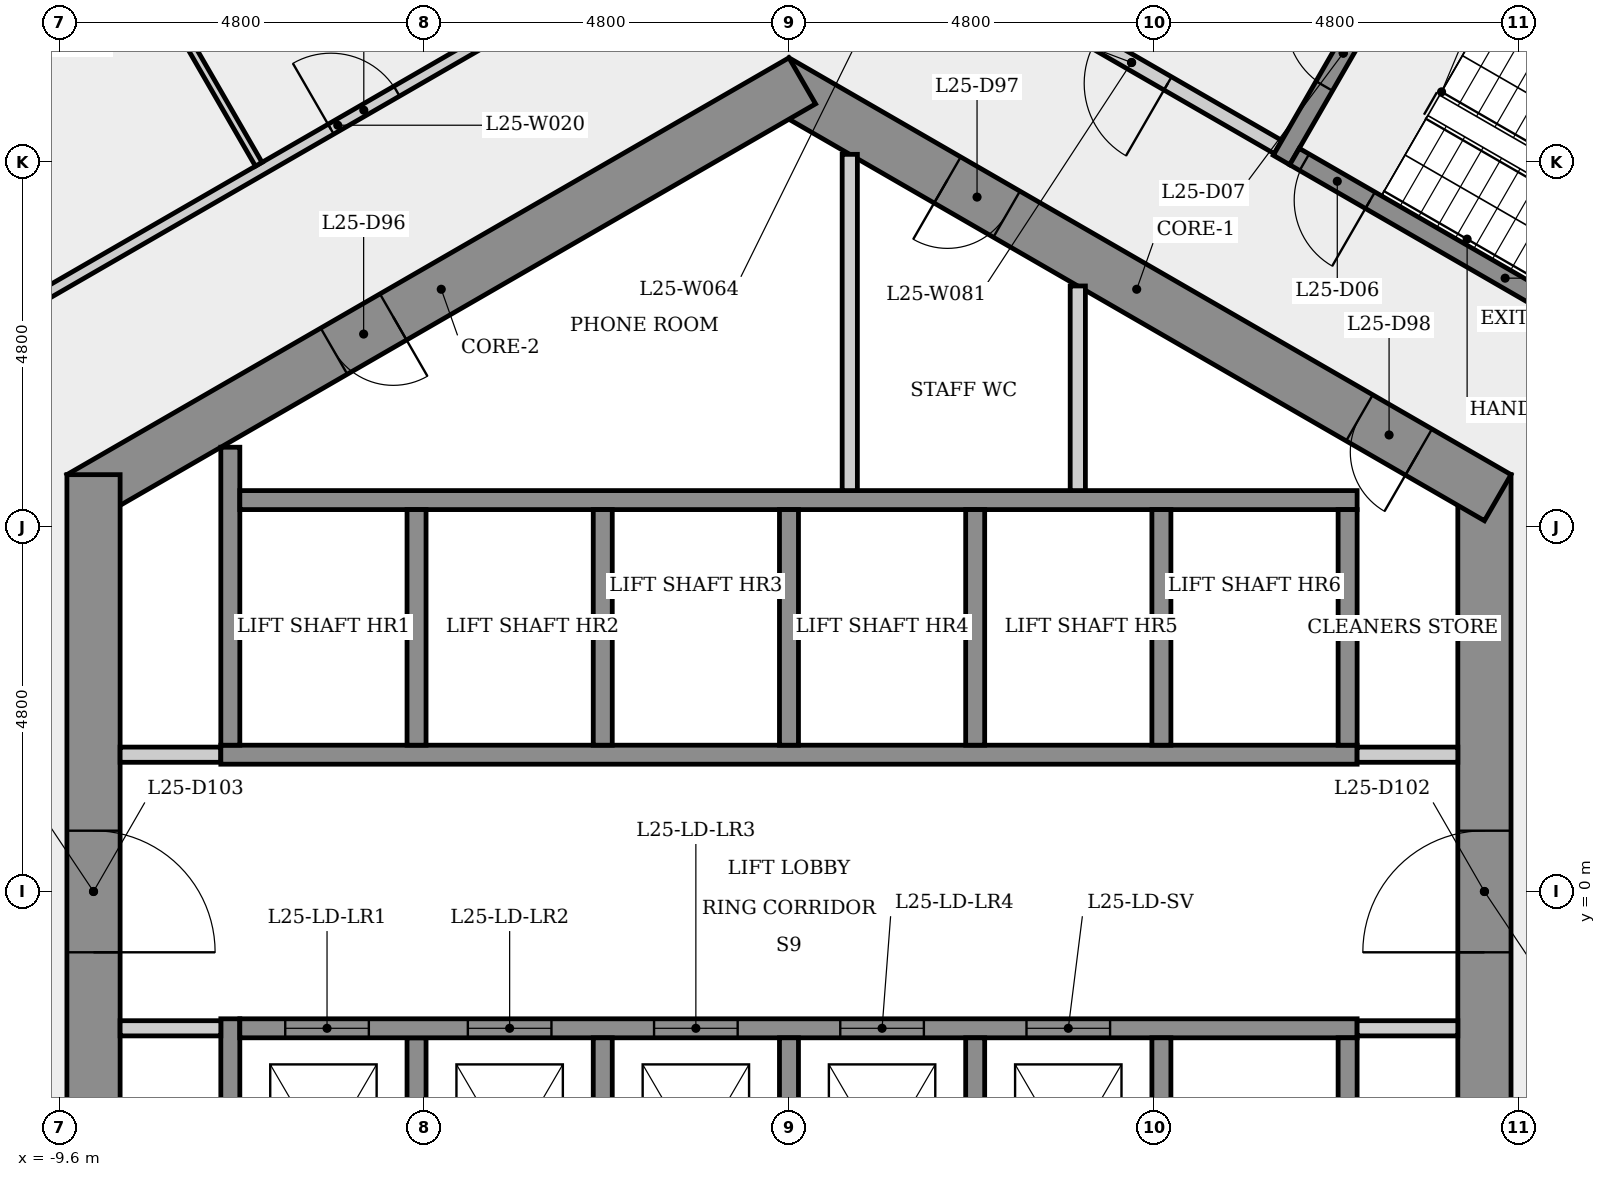
"""IFC4 building model, lengths in metres.
Left out: names, types, materials, properties, quantities, classifications, styles, units other than length and angle.
Written with IfcOpenShell. Run it as: python <this file> out.ifc"""

import sys

from ifc_helpers import new_model, si_unit, direction, frame, frame_2d, origin, place, context, subcontext, project, spatial, rectangle, extrude, element, fill, save


model = new_model("IFC4")
c1 = context("Model", 3, precision=1e-05, world=origin(), true_north=direction((0.0, 1.0)))
c2 = subcontext(c1, "Body", "Model", "MODEL_VIEW")
j1 = project(units=[si_unit("LENGTHUNIT", "METRE"), si_unit("PLANEANGLEUNIT", "RADIAN")], contexts=[c1])
p1 = place(None, origin())
s1 = spatial("IfcSite", under=j1, at=p1, CompositionType="ELEMENT")
p2 = place(p1, origin())
s2 = spatial("IfcBuilding", under=s1, at=p2, CompositionType="ELEMENT")
p3 = place(p2, frame((0.0, 0.0, 96.7)))
s3 = spatial("IfcBuildingStorey", under=s2, at=p3, CompositionType="ELEMENT", Elevation=96.7)
p4 = place(p3, frame((9.15, -5.485, 0.0), z_axis=(0.0, 0.0, 1.0), x_axis=(0.0, 1.0, 0.0)))
e1 = element("IfcWall", 1, at=p4, inside=s3, PredefinedType="SHEAR", context=c2, shape_type="SweptSolid", body=[
    extrude(rectangle(XDim=10.97, YDim=0.7, at=frame_2d((5.485, 0.0))), origin(), (0.0, 0.0, 1.0), 3.4),
])
p5 = place(p4, frame((4.685, 0.0, 0.0)))
e2 = element("IfcOpeningElement", 2, at=p5, cuts=e1, PredefinedType="OPENING", context=c2, shape_type="SweptSolid", body=[
    extrude(rectangle(XDim=1.6, YDim=2.1, at=frame_2d((0.8, 1.05))), frame((0.0, 0.36, 0.0), z_axis=(0.0, -1.0, 0.0), x_axis=(1.0, 0.0, 0.0)), (0.0, 0.0, 1.0), 0.72),
])
p6 = place(p3, frame((9.325, 5.182, 0.0), z_axis=(0.0, 0.0, 1.0), x_axis=(-0.866023993627, 0.500002442456, 0.0)))
e3 = element("IfcWall", 3, at=p6, inside=s3, PredefinedType="SHEAR", context=c2, shape_type="SweptSolid", body=[
    extrude(rectangle(XDim=10.97, YDim=0.7, at=frame_2d((5.485, 0.0))), origin(), (0.0, 0.0, 1.0), 3.4),
])
p7 = place(p6, frame((7.46, 0.0, 0.0)))
e4 = element("IfcOpeningElement", 4, at=p7, cuts=e3, PredefinedType="OPENING", context=c2, shape_type="SweptSolid", body=[
    extrude(rectangle(XDim=0.9, YDim=2.1, at=frame_2d((0.45, 1.05))), frame((0.0, 0.36, 0.0), z_axis=(0.0, -1.0, 0.0), x_axis=(1.0, 0.0, 0.0)), (0.0, 0.0, 1.0), 0.72),
])
p8 = place(p6, frame((1.201, 0.0, 0.0)))
e5 = element("IfcOpeningElement", 5, at=p8, cuts=e3, PredefinedType="OPENING", context=c2, shape_type="SweptSolid", body=[
    extrude(rectangle(XDim=0.9, YDim=2.1, at=frame_2d((0.45, 1.05))), frame((0.0, 0.36, 0.0), z_axis=(0.0, -1.0, 0.0), x_axis=(1.0, 0.0, 0.0)), (0.0, 0.0, 1.0), 0.72),
])
p9 = place(p3, frame((0.175, 10.667, 0.0), z_axis=(0.0, 0.0, 1.0), x_axis=(-0.866023993627, -0.500002442456, 0.0)))
e6 = element("IfcWall", 6, at=p9, inside=s3, PredefinedType="SHEAR", context=c2, shape_type="SweptSolid", body=[
    extrude(rectangle(XDim=10.97, YDim=0.7, at=frame_2d((5.485, 0.0))), origin(), (0.0, 0.0, 1.0), 3.4),
])
p10 = place(p9, frame((6.214, 0.0, 0.0)))
e7 = element("IfcOpeningElement", 7, at=p10, cuts=e6, PredefinedType="OPENING", context=c2, shape_type="SweptSolid", body=[
    extrude(rectangle(XDim=0.9, YDim=2.1, at=frame_2d((0.45, 1.05))), frame((0.0, 0.36, 0.0), z_axis=(0.0, -1.0, 0.0), x_axis=(1.0, 0.0, 0.0)), (0.0, 0.0, 1.0), 0.72),
])
p11 = place(p3, frame((-9.15, 5.485, 0.0), z_axis=(0.0, 0.0, 1.0), x_axis=(0.0, -1.0, 0.0)))
e8 = element("IfcWall", 8, at=p11, inside=s3, PredefinedType="SHEAR", context=c2, shape_type="SweptSolid", body=[
    extrude(rectangle(XDim=10.97, YDim=0.7, at=frame_2d((5.485, 0.0))), origin(), (0.0, 0.0, 1.0), 3.4),
])
p12 = place(p11, frame((4.685, 0.0, 0.0)))
e9 = element("IfcOpeningElement", 9, at=p12, cuts=e8, PredefinedType="OPENING", context=c2, shape_type="SweptSolid", body=[
    extrude(rectangle(XDim=1.6, YDim=2.1, at=frame_2d((0.8, 1.05))), frame((0.0, 0.36, 0.0), z_axis=(0.0, -1.0, 0.0), x_axis=(1.0, 0.0, 0.0)), (0.0, 0.0, 1.0), 0.72),
])
p13 = place(p3, frame((-10.588, 7.397, 0.0), z_axis=(0.0, 0.0, 1.0), x_axis=(0.866026257053, 0.499998522093, 0.0)))
e10 = element("IfcWall", 10, at=p13, inside=s3, PredefinedType="PARTITIONING", context=c2, shape_type="SweptSolid", body=[
    extrude(rectangle(XDim=10.743, YDim=0.15, at=frame_2d((5.371, 0.0))), origin(), (0.0, 0.0, 1.0), 3.05),
])
p14 = place(p13, frame((5.267, 0.0, 0.0)))
e11 = element("IfcOpeningElement", 11, at=p14, cuts=e10, PredefinedType="OPENING", context=c2, shape_type="SweptSolid", body=[
    extrude(rectangle(XDim=1.0, YDim=2.1, at=frame_2d((0.5, 1.05))), frame((0.0, 0.085, 0.0), z_axis=(0.0, -1.0, 0.0), x_axis=(1.0, 0.0, 0.0)), (0.0, 0.0, 1.0), 0.17),
])
p15 = place(p3, frame((-8.8, 1.8, 0.0), z_axis=(0.0, 0.0, 1.0), x_axis=(1.0, 0.0, 0.0)))
e12 = element("IfcWall", 12, at=p15, inside=s3, PredefinedType="PARTITIONING", context=c2, shape_type="SweptSolid", body=[
    extrude(rectangle(XDim=1.325, YDim=0.2, at=frame_2d((0.663, 0.0))), origin(), (0.0, 0.0, 1.0), 3.05),
])
p16 = place(p3, frame((-7.475, 1.8, 0.0), z_axis=(0.0, 0.0, 1.0), x_axis=(1.0, 0.0, 0.0)))
e13 = element("IfcWall", 13, at=p16, inside=s3, PredefinedType="SHEAR", context=c2, shape_type="SweptSolid", body=[
    extrude(rectangle(XDim=14.95, YDim=0.25, at=frame_2d((7.475, 0.0))), origin(), (0.0, 0.0, 1.0), 3.05),
])
p17 = place(p3, frame((-7.35, -5.846, 0.0), z_axis=(0.0, 0.0, 1.0), x_axis=(0.0, 1.0, 0.0)))
e14 = element("IfcWall", 14, at=p17, inside=s3, PredefinedType="SHEAR", context=c2, shape_type="SweptSolid", body=[
    extrude(rectangle(XDim=4.171, YDim=0.25, at=frame_2d((2.085, 0.0))), origin(), (0.0, 0.0, 1.0), 3.05),
])
p18 = place(p3, frame((-7.35, 1.925, 0.0), z_axis=(0.0, 0.0, 1.0), x_axis=(0.0, 1.0, 0.0)))
e15 = element("IfcWall", 15, at=p18, inside=s3, PredefinedType="SHEAR", context=c2, shape_type="SweptSolid", body=[
    extrude(rectangle(XDim=3.921, YDim=0.25, at=frame_2d((1.96, 0.0))), origin(), (0.0, 0.0, 1.0), 3.05),
])
p19 = place(p3, frame((-7.225, 5.15, 0.0), z_axis=(0.0, 0.0, 1.0), x_axis=(1.0, 0.0, 0.0)))
e16 = element("IfcWall", 16, at=p19, inside=s3, PredefinedType="SHEAR", context=c2, shape_type="SweptSolid", body=[
    extrude(rectangle(XDim=14.7, YDim=0.25, at=frame_2d((7.35, 0.0))), origin(), (0.0, 0.0, 1.0), 3.05),
])
p20 = place(p3, frame((-7.475, -1.8, 0.0), z_axis=(0.0, 0.0, 1.0), x_axis=(-1.0, 0.0, 0.0)))
e17 = element("IfcWall", 17, at=p20, inside=s3, PredefinedType="PARTITIONING", context=c2, shape_type="SweptSolid", body=[
    extrude(rectangle(XDim=1.325, YDim=0.2, at=frame_2d((0.663, 0.0))), origin(), (0.0, 0.0, 1.0), 3.05),
])
p21 = place(p3, frame((-6.976, 9.569, 0.0), z_axis=(0.0, 0.0, 1.0), x_axis=(-0.499997453958, 0.866026873738, 0.0)))
e18 = element("IfcWall", 18, at=p21, inside=s3, PredefinedType="PARTITIONING", context=c2, shape_type="SweptSolid", body=[
    extrude(rectangle(XDim=7.71, YDim=0.1, at=frame_2d((3.855, 0.0))), origin(), (0.0, 0.0, 1.0), 3.05),
])
for number, where, z_axis, x_axis in (
    (19, (-4.9, -1.925, 0.0), (0.0, 0.0, 1.0), (0.0, -1.0, 0.0)),
    (20, (-4.9, 5.025, 0.0), (0.0, 0.0, 1.0), (0.0, -1.0, 0.0)),
):
    element("IfcWall", number, at=place(p3, frame(where, z_axis=z_axis, x_axis=x_axis)), inside=s3, PredefinedType="SHEAR", context=c2, shape_type="SweptSolid", body=[
        extrude(rectangle(XDim=3.1, YDim=0.25, at=frame_2d((1.55, 0.0))), origin(), (0.0, 0.0, 1.0), 3.4),
    ])
p22 = place(p3, frame((-7.225, -1.8, 0.0), z_axis=(0.0, 0.0, 1.0), x_axis=(1.0, 0.0, 0.0)))
e21 = element("IfcWall", 21, at=p22, inside=s3, PredefinedType="SHEAR", context=c2, shape_type="SweptSolid", body=[
    extrude(rectangle(XDim=14.7, YDim=0.25, at=frame_2d((7.35, 0.0))), origin(), (0.0, 0.0, 1.0), 3.05),
])
p23 = place(p22, frame((0.597, 0.0, 0.0)))
e22 = element("IfcOpeningElement", 22, at=p23, cuts=e21, PredefinedType="OPENING", context=c2, shape_type="SweptSolid", body=[
    extrude(rectangle(XDim=1.1, YDim=2.1, at=frame_2d((0.55, 1.05))), frame((0.0, 0.135, 0.0), z_axis=(0.0, -1.0, 0.0), x_axis=(1.0, 0.0, 0.0)), (0.0, 0.0, 1.0), 0.27),
])
p24 = place(p22, frame((3.0, 0.0, 0.0)))
e23 = element("IfcOpeningElement", 23, at=p24, cuts=e21, PredefinedType="OPENING", context=c2, shape_type="SweptSolid", body=[
    extrude(rectangle(XDim=1.1, YDim=2.1, at=frame_2d((0.55, 1.05))), frame((0.0, 0.135, 0.0), z_axis=(0.0, -1.0, 0.0), x_axis=(1.0, 0.0, 0.0)), (0.0, 0.0, 1.0), 0.27),
])
p25 = place(p22, frame((5.45, 0.0, 0.0)))
e24 = element("IfcOpeningElement", 24, at=p25, cuts=e21, PredefinedType="OPENING", context=c2, shape_type="SweptSolid", body=[
    extrude(rectangle(XDim=1.1, YDim=2.1, at=frame_2d((0.55, 1.05))), frame((0.0, 0.135, 0.0), z_axis=(0.0, -1.0, 0.0), x_axis=(1.0, 0.0, 0.0)), (0.0, 0.0, 1.0), 0.27),
])
p26 = place(p22, frame((7.9, 0.0, 0.0)))
e25 = element("IfcOpeningElement", 25, at=p26, cuts=e21, PredefinedType="OPENING", context=c2, shape_type="SweptSolid", body=[
    extrude(rectangle(XDim=1.1, YDim=2.1, at=frame_2d((0.55, 1.05))), frame((0.0, 0.135, 0.0), z_axis=(0.0, -1.0, 0.0), x_axis=(1.0, 0.0, 0.0)), (0.0, 0.0, 1.0), 0.27),
])
p27 = place(p22, frame((10.35, 0.0, 0.0)))
e26 = element("IfcOpeningElement", 26, at=p27, cuts=e21, PredefinedType="OPENING", context=c2, shape_type="SweptSolid", body=[
    extrude(rectangle(XDim=1.1, YDim=2.1, at=frame_2d((0.55, 1.05))), frame((0.0, 0.135, 0.0), z_axis=(0.0, -1.0, 0.0), x_axis=(1.0, 0.0, 0.0)), (0.0, 0.0, 1.0), 0.27),
])
for number, where, z_axis, x_axis in (
    (27, (-2.45, -1.925, 0.0), (0.0, 0.0, 1.0), (0.0, -1.0, 0.0)),
    (28, (-2.45, 5.025, 0.0), (0.0, 0.0, 1.0), (0.0, -1.0, 0.0)),
    (29, (0.0, -1.925, 0.0), (0.0, 0.0, 1.0), (0.0, -1.0, 0.0)),
    (30, (0.0, 5.025, 0.0), (0.0, 0.0, 1.0), (0.0, -1.0, 0.0)),
):
    element("IfcWall", number, at=place(p3, frame(where, z_axis=z_axis, x_axis=x_axis)), inside=s3, PredefinedType="SHEAR", context=c2, shape_type="SweptSolid", body=[
        extrude(rectangle(XDim=3.1, YDim=0.25, at=frame_2d((1.55, 0.0))), origin(), (0.0, 0.0, 1.0), 3.4),
    ])
p28 = place(p3, frame((0.8, 9.699, 0.0), z_axis=(0.0, 0.0, 1.0), x_axis=(0.0, -1.0, 0.0)))
e31 = element("IfcWall", 31, at=p28, inside=s3, PredefinedType="PARTITIONING", context=c2, shape_type="SweptSolid", body=[
    extrude(rectangle(XDim=4.425, YDim=0.2, at=frame_2d((2.212, 0.0))), origin(), (0.0, 0.0, 1.0), 3.05),
])
for number, where, z_axis, x_axis in (
    (32, (2.45, -1.925, 0.0), (0.0, 0.0, 1.0), (0.0, -1.0, 0.0)),
    (33, (2.45, 5.025, 0.0), (0.0, 0.0, 1.0), (0.0, -1.0, 0.0)),
):
    element("IfcWall", number, at=place(p3, frame(where, z_axis=z_axis, x_axis=x_axis)), inside=s3, PredefinedType="SHEAR", context=c2, shape_type="SweptSolid", body=[
        extrude(rectangle(XDim=3.1, YDim=0.25, at=frame_2d((1.55, 0.0))), origin(), (0.0, 0.0, 1.0), 3.4),
    ])
p29 = place(p3, frame((3.8, 7.967, 0.0), z_axis=(0.0, 0.0, 1.0), x_axis=(0.0, -1.0, 0.0)))
e34 = element("IfcWall", 34, at=p29, inside=s3, PredefinedType="PARTITIONING", context=c2, shape_type="SweptSolid", body=[
    extrude(rectangle(XDim=2.692, YDim=0.2, at=frame_2d((1.346, 0.0))), origin(), (0.0, 0.0, 1.0), 3.05),
])
for number, where, z_axis, x_axis in (
    (35, (4.9, -1.925, 0.0), (0.0, 0.0, 1.0), (0.0, -1.0, 0.0)),
    (36, (4.9, 5.025, 0.0), (0.0, 0.0, 1.0), (0.0, -1.0, 0.0)),
):
    element("IfcWall", number, at=place(p3, frame(where, z_axis=z_axis, x_axis=x_axis)), inside=s3, PredefinedType="SHEAR", context=c2, shape_type="SweptSolid", body=[
        extrude(rectangle(XDim=3.1, YDim=0.25, at=frame_2d((1.55, 0.0))), origin(), (0.0, 0.0, 1.0), 3.4),
    ])
p30 = place(p3, frame((6.435, 9.795, 0.0), z_axis=(0.0, 0.0, 1.0), x_axis=(-0.866012907634, 0.500021643343, 0.0)))
e37 = element("IfcWall", 37, at=p30, inside=s3, PredefinedType="PARTITIONING", context=c2, shape_type="SweptSolid", body=[
    extrude(rectangle(XDim=4.45, YDim=0.2, at=frame_2d((2.225, 0.0))), origin(), (0.0, 0.0, 1.0), 3.05),
])
p31 = place(p30, frame((1.675, 0.0, 0.0)))
e38 = element("IfcOpeningElement", 38, at=p31, cuts=e37, PredefinedType="OPENING", context=c2, shape_type="SweptSolid", body=[
    extrude(rectangle(XDim=1.1, YDim=2.1, at=frame_2d((0.55, 1.05))), frame((0.0, 0.11, 0.0), z_axis=(0.0, -1.0, 0.0), x_axis=(1.0, 0.0, 0.0)), (0.0, 0.0, 1.0), 0.22),
])
p32 = place(p3, frame((6.48, 9.624, 0.0), z_axis=(0.0, 0.0, 1.0), x_axis=(0.500017246033, 0.866015446554, 0.0)))
e39 = element("IfcWall", 39, at=p32, inside=s3, PredefinedType="SHEAR", context=c2, shape_type="SweptSolid", body=[
    extrude(rectangle(XDim=3.25, YDim=0.25, at=frame_2d((1.625, 0.0))), origin(), (0.0, 0.0, 1.0), 3.05),
])
p33 = place(p32, frame((1.125, 0.0, 0.0)))
e40 = element("IfcOpeningElement", 40, at=p33, cuts=e39, PredefinedType="OPENING", context=c2, shape_type="SweptSolid", body=[
    extrude(rectangle(XDim=1.0, YDim=2.1, at=frame_2d((0.5, 1.05))), frame((0.0, 0.135, 0.0), z_axis=(0.0, -1.0, 0.0), x_axis=(1.0, 0.0, 0.0)), (0.0, 0.0, 1.0), 0.27),
])
p34 = place(p3, frame((7.475, 1.8, 0.0), z_axis=(0.0, 0.0, 1.0), x_axis=(1.0, 0.0, 0.0)))
e41 = element("IfcWall", 41, at=p34, inside=s3, PredefinedType="PARTITIONING", context=c2, shape_type="SweptSolid", body=[
    extrude(rectangle(XDim=1.325, YDim=0.2, at=frame_2d((0.663, 0.0))), origin(), (0.0, 0.0, 1.0), 3.05),
])
for number, where, z_axis, x_axis in (
    (42, (7.35, -1.925, 0.0), (0.0, 0.0, 1.0), (0.0, -1.0, 0.0)),
    (43, (7.35, 5.025, 0.0), (0.0, 0.0, 1.0), (0.0, -1.0, 0.0)),
):
    element("IfcWall", number, at=place(p3, frame(where, z_axis=z_axis, x_axis=x_axis)), inside=s3, PredefinedType="SHEAR", context=c2, shape_type="SweptSolid", body=[
        extrude(rectangle(XDim=3.1, YDim=0.25, at=frame_2d((1.55, 0.0))), origin(), (0.0, 0.0, 1.0), 3.4),
    ])
p35 = place(p3, frame((8.151, 12.268, 0.0), z_axis=(0.0, 0.0, 1.0), x_axis=(0.866025499775, -0.499999833739, 0.0)))
e44 = element("IfcWall", 44, at=p35, inside=s3, PredefinedType="SHEAR", context=c2, shape_type="SweptSolid", body=[
    extrude(rectangle(XDim=6.4, YDim=0.25, at=frame_2d((3.2, 0.0))), origin(), (0.0, 0.0, 1.0), 3.05),
])
p36 = place(p3, frame((8.8, -1.8, 0.0), z_axis=(0.0, 0.0, 1.0), x_axis=(-1.0, 0.0, 0.0)))
e45 = element("IfcWall", 45, at=p36, inside=s3, PredefinedType="PARTITIONING", context=c2, shape_type="SweptSolid", body=[
    extrude(rectangle(XDim=1.325, YDim=0.2, at=frame_2d((0.663, 0.0))), origin(), (0.0, 0.0, 1.0), 3.05),
])
p37 = place(p3, frame((12.194, 6.47, 0.0), z_axis=(0.0, 0.0, 1.0), x_axis=(-0.866025499775, 0.499999833739, 0.0)))
e46 = element("IfcWall", 46, at=p37, inside=s3, PredefinedType="SHEAR", context=c2, shape_type="SweptSolid", body=[
    extrude(rectangle(XDim=6.4, YDim=0.25, at=frame_2d((3.2, 0.0))), origin(), (0.0, 0.0, 1.0), 3.05),
])
p38 = place(p37, frame((5.25, 0.0, 0.0)))
e47 = element("IfcOpeningElement", 47, at=p38, cuts=e46, PredefinedType="OPENING", context=c2, shape_type="SweptSolid", body=[
    extrude(rectangle(XDim=1.0, YDim=2.1, at=frame_2d((0.5, 1.05))), frame((0.0, 0.135, 0.0), z_axis=(0.0, -1.0, 0.0), x_axis=(1.0, 0.0, 0.0)), (0.0, 0.0, 1.0), 0.27),
])
p39 = place(p23, origin())
e48 = element("IfcDoor", 48, at=p39, inside=s3, OperationType="SLIDING_TO_LEFT", PredefinedType="DOOR", context=c2, shape_type="SweptSolid", body=[
    extrude(rectangle(XDim=1.1, YDim=2.1, at=frame_2d((0.55, 1.05))), frame((0.0, 0.025, 0.0), z_axis=(0.0, -1.0, 0.0), x_axis=(1.0, 0.0, 0.0)), (0.0, 0.0, 1.0), 0.05),
])
fill(e22, e48)
p40 = place(p24, origin())
e49 = element("IfcDoor", 49, at=p40, inside=s3, OperationType="SLIDING_TO_LEFT", PredefinedType="DOOR", context=c2, shape_type="SweptSolid", body=[
    extrude(rectangle(XDim=1.1, YDim=2.1, at=frame_2d((0.55, 1.05))), frame((0.0, 0.025, 0.0), z_axis=(0.0, -1.0, 0.0), x_axis=(1.0, 0.0, 0.0)), (0.0, 0.0, 1.0), 0.05),
])
fill(e23, e49)
p41 = place(p25, origin())
e50 = element("IfcDoor", 50, at=p41, inside=s3, OperationType="SLIDING_TO_LEFT", PredefinedType="DOOR", context=c2, shape_type="SweptSolid", body=[
    extrude(rectangle(XDim=1.1, YDim=2.1, at=frame_2d((0.55, 1.05))), frame((0.0, 0.025, 0.0), z_axis=(0.0, -1.0, 0.0), x_axis=(1.0, 0.0, 0.0)), (0.0, 0.0, 1.0), 0.05),
])
fill(e24, e50)
p42 = place(p26, origin())
e51 = element("IfcDoor", 51, at=p42, inside=s3, OperationType="SLIDING_TO_LEFT", PredefinedType="DOOR", context=c2, shape_type="SweptSolid", body=[
    extrude(rectangle(XDim=1.1, YDim=2.1, at=frame_2d((0.55, 1.05))), frame((0.0, 0.025, 0.0), z_axis=(0.0, -1.0, 0.0), x_axis=(1.0, 0.0, 0.0)), (0.0, 0.0, 1.0), 0.05),
])
fill(e25, e51)
p43 = place(p27, origin())
e52 = element("IfcDoor", 52, at=p43, inside=s3, OperationType="SLIDING_TO_LEFT", PredefinedType="DOOR", context=c2, shape_type="SweptSolid", body=[
    extrude(rectangle(XDim=1.1, YDim=2.1, at=frame_2d((0.55, 1.05))), frame((0.0, 0.025, 0.0), z_axis=(0.0, -1.0, 0.0), x_axis=(1.0, 0.0, 0.0)), (0.0, 0.0, 1.0), 0.05),
])
fill(e26, e52)
p44 = place(p38, origin())
e53 = element("IfcDoor", 53, at=p44, inside=s3, OperationType="SINGLE_SWING_LEFT", PredefinedType="DOOR", context=c2, shape_type="SweptSolid", body=[
    extrude(rectangle(XDim=1.0, YDim=2.1, at=frame_2d((0.5, 1.05))), frame((0.0, 0.025, 0.0), z_axis=(0.0, -1.0, 0.0), x_axis=(1.0, 0.0, 0.0)), (0.0, 0.0, 1.0), 0.05),
])
fill(e47, e53)
p45 = place(p33, origin())
e54 = element("IfcDoor", 54, at=p45, inside=s3, OperationType="SINGLE_SWING_RIGHT", PredefinedType="DOOR", context=c2, shape_type="SweptSolid", body=[
    extrude(rectangle(XDim=1.0, YDim=2.1, at=frame_2d((0.5, 1.05))), frame((0.0, 0.025, 0.0), z_axis=(0.0, -1.0, 0.0), x_axis=(1.0, 0.0, 0.0)), (0.0, 0.0, 1.0), 0.05),
])
fill(e40, e54)
p46 = place(p31, origin())
e55 = element("IfcDoor", 55, at=p46, inside=s3, OperationType="SINGLE_SWING_LEFT", PredefinedType="DOOR", context=c2, shape_type="SweptSolid", body=[
    extrude(rectangle(XDim=1.1, YDim=2.1, at=frame_2d((0.55, 1.05))), frame((0.0, 0.025, 0.0), z_axis=(0.0, -1.0, 0.0), x_axis=(1.0, 0.0, 0.0)), (0.0, 0.0, 1.0), 0.05),
])
fill(e38, e55)
p47 = place(p14, origin())
e56 = element("IfcDoor", 56, at=p47, inside=s3, OperationType="SINGLE_SWING_LEFT", PredefinedType="DOOR", context=c2, shape_type="SweptSolid", body=[
    extrude(rectangle(XDim=1.0, YDim=2.1, at=frame_2d((0.5, 1.05))), frame((0.0, 0.025, 0.0), z_axis=(0.0, -1.0, 0.0), x_axis=(1.0, 0.0, 0.0)), (0.0, 0.0, 1.0), 0.05),
])
fill(e11, e56)
p48 = place(p10, origin())
e57 = element("IfcDoor", 57, at=p48, inside=s3, OperationType="SINGLE_SWING_LEFT", PredefinedType="DOOR", context=c2, shape_type="SweptSolid", body=[
    extrude(rectangle(XDim=0.9, YDim=2.1, at=frame_2d((0.45, 1.05))), frame((0.0, 0.025, 0.0), z_axis=(0.0, -1.0, 0.0), x_axis=(1.0, 0.0, 0.0)), (0.0, 0.0, 1.0), 0.05),
])
fill(e7, e57)
p49 = place(p7, origin())
e58 = element("IfcDoor", 58, at=p49, inside=s3, OperationType="SINGLE_SWING_RIGHT", PredefinedType="DOOR", context=c2, shape_type="SweptSolid", body=[
    extrude(rectangle(XDim=0.9, YDim=2.1, at=frame_2d((0.45, 1.05))), frame((0.0, 0.025, 0.0), z_axis=(0.0, -1.0, 0.0), x_axis=(1.0, 0.0, 0.0)), (0.0, 0.0, 1.0), 0.05),
])
fill(e4, e58)
p50 = place(p8, origin())
e59 = element("IfcDoor", 59, at=p50, inside=s3, OperationType="SINGLE_SWING_LEFT", PredefinedType="DOOR", context=c2, shape_type="SweptSolid", body=[
    extrude(rectangle(XDim=0.9, YDim=2.1, at=frame_2d((0.45, 1.05))), frame((0.0, 0.025, 0.0), z_axis=(0.0, -1.0, 0.0), x_axis=(1.0, 0.0, 0.0)), (0.0, 0.0, 1.0), 0.05),
])
fill(e5, e59)
p51 = place(p5, origin())
e60 = element("IfcDoor", 60, at=p51, inside=s3, OperationType="SINGLE_SWING_LEFT", PredefinedType="DOOR", context=c2, shape_type="SweptSolid", body=[
    extrude(rectangle(XDim=1.6, YDim=2.1, at=frame_2d((0.8, 1.05))), frame((0.0, 0.025, 0.0), z_axis=(0.0, -1.0, 0.0), x_axis=(1.0, 0.0, 0.0)), (0.0, 0.0, 1.0), 0.05),
])
fill(e2, e60)
p52 = place(p12, origin())
e61 = element("IfcDoor", 61, at=p52, inside=s3, OperationType="SINGLE_SWING_RIGHT", PredefinedType="DOOR", context=c2, shape_type="SweptSolid", body=[
    extrude(rectangle(XDim=1.6, YDim=2.1, at=frame_2d((0.8, 1.05))), frame((0.0, 0.025, 0.0), z_axis=(0.0, -1.0, 0.0), x_axis=(1.0, 0.0, 0.0)), (0.0, 0.0, 1.0), 0.05),
])
fill(e9, e61)
save(model, sys.argv[1])
